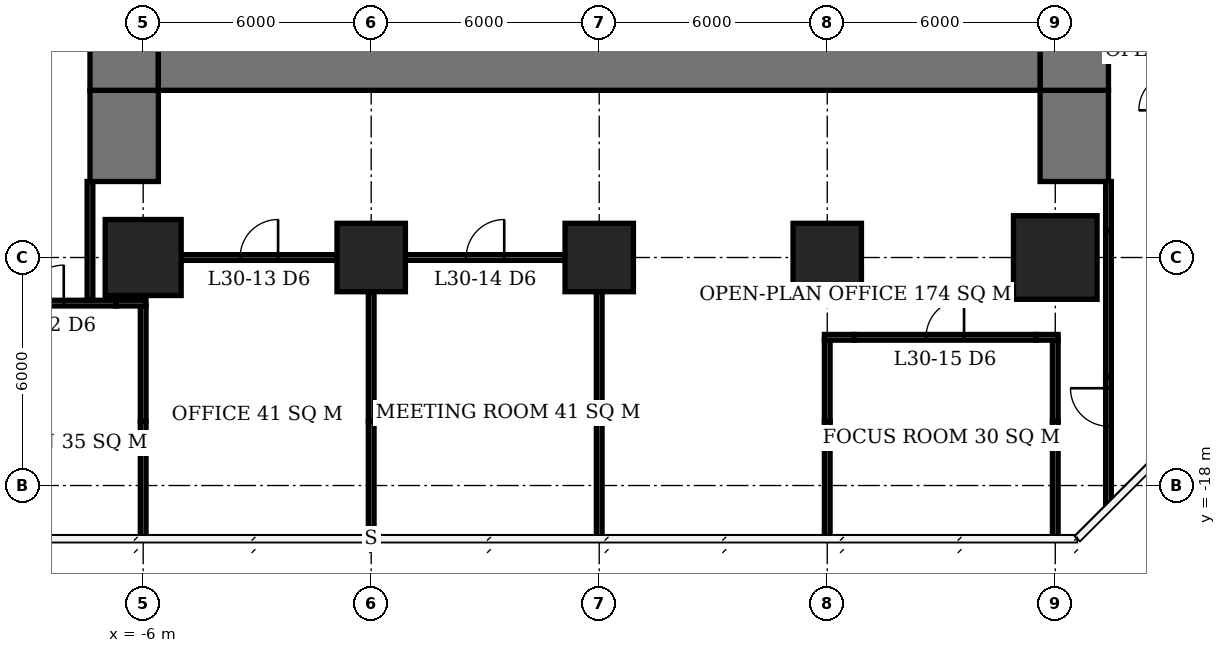
"""IFC4 building model, lengths in metres.
Left out: names, types, materials, properties, quantities, classifications, styles, units other than length and angle.
Written with IfcOpenShell. Run it as: python <this file> out.ifc"""

import sys

from ifc_helpers import new_model, si_unit, direction, frame, frame_2d, origin, origin_2d, place, context, subcontext, project, spatial, rectangle, extrude, element, fill, save


model = new_model("IFC4")
c1 = context("Model", 3, precision=1e-05, world=origin(), true_north=direction((0.0, 1.0)))
c2 = subcontext(c1, "Body", "Model", "MODEL_VIEW")
j1 = project(units=[si_unit("LENGTHUNIT", "METRE"), si_unit("PLANEANGLEUNIT", "RADIAN")], contexts=[c1])
p1 = place(None, origin())
s1 = spatial("IfcSite", under=j1, at=p1, CompositionType="ELEMENT")
p2 = place(p1, origin())
s2 = spatial("IfcBuilding", under=s1, at=p2, CompositionType="ELEMENT")
p3 = place(p2, frame((0.0, 0.0, 125.0)))
s3 = spatial("IfcBuildingStorey", under=s2, at=p3, CompositionType="ELEMENT", Elevation=125.0)
p4 = place(p3, frame((-6.0, -12.0, 0.0), z_axis=(0.0, 0.0, 1.0), x_axis=(1.0, 0.0, 0.0)))
e1 = element("IfcColumn", 1, at=p4, inside=s3, PredefinedType="COLUMN", context=c2, shape_type="SweptSolid", body=[
    extrude(rectangle(XDim=2.0, YDim=2.0, at=origin_2d()), origin(), (0.0, 0.0, 1.0), 3.9),
])
for number, where, z_axis, x_axis in (
    (2, (0.0, -12.0, 0.0), (0.0, 0.0, 1.0), (1.0, 0.0, 0.0)),
    (3, (6.0, -12.0, 0.0), (0.0, 0.0, 1.0), (1.0, 0.0, 0.0)),
    (4, (12.0, -12.0, 0.0), (0.0, 0.0, 1.0), (1.0, 0.0, 0.0)),
):
    element("IfcColumn", number, at=place(p3, frame(where, z_axis=z_axis, x_axis=x_axis)), inside=s3, PredefinedType="COLUMN", context=c2, shape_type="SweptSolid", body=[
        extrude(rectangle(XDim=1.8, YDim=1.8, at=origin_2d()), origin(), (0.0, 0.0, 1.0), 3.9),
    ])
p5 = place(p3, frame((18.0, -12.0, 0.0), z_axis=(0.0, 0.0, 1.0), x_axis=(1.0, 0.0, 0.0)))
e5 = element("IfcColumn", 5, at=p5, inside=s3, PredefinedType="COLUMN", context=c2, shape_type="SweptSolid", body=[
    extrude(rectangle(XDim=2.2, YDim=2.2, at=origin_2d()), origin(), (0.0, 0.0, 1.0), 3.9),
])
p6 = place(p3, frame((-5.6, -6.6, 0.0), z_axis=(0.0, 0.0, 1.0), x_axis=(1.0, 0.0, 0.0)))
e6 = element("IfcWall", 6, at=p6, inside=s3, PredefinedType="SHEAR", context=c2, shape_type="SweptSolid", body=[
    extrude(rectangle(XDim=23.2, YDim=2.0, at=frame_2d((11.6, 0.0))), origin(), (0.0, 0.0, 1.0), 3.9),
])
p7 = place(p3, frame((-6.5, -7.6, 0.0), z_axis=(0.0, 0.0, 1.0), x_axis=(0.0, 1.0, 0.0)))
e7 = element("IfcWall", 7, at=p7, inside=s3, PredefinedType="SHEAR", context=c2, shape_type="SweptSolid", body=[
    extrude(rectangle(XDim=21.2, YDim=1.8, at=frame_2d((10.6, 0.0))), origin(), (0.0, 0.0, 1.0), 3.9),
])
p8 = place(p7, frame((7.8, 0.0, 0.0)))
e8 = element("IfcOpeningElement", 8, at=p8, cuts=e7, PredefinedType="OPENING", context=c2, shape_type="SweptSolid", body=[
    extrude(rectangle(XDim=1.8, YDim=2.4, at=frame_2d((0.9, 1.2))), frame((0.0, 0.91, 0.0), z_axis=(0.0, -1.0, 0.0), x_axis=(1.0, 0.0, 0.0)), (0.0, 0.0, 1.0), 1.82),
])
p9 = place(p3, frame((18.5, -7.6, 0.0), z_axis=(0.0, 0.0, 1.0), x_axis=(0.0, 1.0, 0.0)))
e9 = element("IfcWall", 9, at=p9, inside=s3, PredefinedType="SHEAR", context=c2, shape_type="SweptSolid", body=[
    extrude(rectangle(XDim=21.2, YDim=1.8, at=frame_2d((10.6, 0.0))), origin(), (0.0, 0.0, 1.0), 3.9),
])
p10 = place(p9, frame((9.2, 0.0, 0.0)))
e10 = element("IfcOpeningElement", 10, at=p10, cuts=e9, PredefinedType="OPENING", context=c2, shape_type="SweptSolid", body=[
    extrude(rectangle(XDim=1.8, YDim=2.4, at=frame_2d((0.9, 1.2))), frame((0.0, 0.91, 0.0), z_axis=(0.0, -1.0, 0.0), x_axis=(1.0, 0.0, 0.0)), (0.0, 0.0, 1.0), 1.82),
])
for number, where, z_axis, x_axis in (
    (11, (-6.5, -10.0, 0.0), (0.0, 0.0, 1.0), (0.0, 1.0, 0.0)),
    (12, (18.5, -10.0, 0.0), (0.0, 0.0, 1.0), (0.0, 1.0, 0.0)),
):
    element("IfcWall", number, at=place(p3, frame(where, z_axis=z_axis, x_axis=x_axis)), inside=s3, PredefinedType="SHEAR", context=c2, shape_type="SweptSolid", body=[
        extrude(rectangle(XDim=2.4, YDim=1.8, at=frame_2d((1.2, 0.0))), origin(), (0.0, 0.0, 1.0), 3.9),
    ])
p11 = place(p3, frame((11.925, -14.1, 0.0), z_axis=(0.0, 0.0, 1.0), x_axis=(1.0, 0.0, 0.0)))
e13 = element("IfcWall", 13, at=p11, inside=s3, PredefinedType="PARTITIONING", context=c2, shape_type="SweptSolid", body=[
    extrude(rectangle(XDim=0.785, YDim=0.15, at=frame_2d((0.393, 0.0))), origin(), (0.0, 0.0, 1.0), 2.65),
])
p12 = place(p3, frame((12.71, -14.1, 0.0), z_axis=(0.0, 0.0, 1.0), x_axis=(1.0, 0.0, 0.0)))
e14 = element("IfcWall", 14, at=p12, inside=s3, PredefinedType="PARTITIONING", context=c2, shape_type="SweptSolid", body=[
    extrude(rectangle(XDim=4.78, YDim=0.15, at=frame_2d((2.39, 0.0))), origin(), (0.0, 0.0, 1.0), 3.65),
])
p13 = place(p12, frame((1.89, 0.0, 0.0)))
e15 = element("IfcOpeningElement", 15, at=p13, cuts=e14, PredefinedType="OPENING", context=c2, shape_type="SweptSolid", body=[
    extrude(rectangle(XDim=1.0, YDim=2.1, at=frame_2d((0.5, 1.05))), frame((0.0, 0.085, 0.0), z_axis=(0.0, -1.0, 0.0), x_axis=(1.0, 0.0, 0.0)), (0.0, 0.0, 1.0), 0.17),
])
p14 = place(p3, frame((17.49, -14.1, 0.0), z_axis=(0.0, 0.0, 1.0), x_axis=(1.0, 0.0, 0.0)))
e16 = element("IfcWall", 16, at=p14, inside=s3, PredefinedType="PARTITIONING", context=c2, shape_type="SweptSolid", body=[
    extrude(rectangle(XDim=0.585, YDim=0.15, at=frame_2d((0.292, 0.0))), origin(), (0.0, 0.0, 1.0), 2.65),
])
p15 = place(p3, frame((-11.29, -13.2, 0.0), z_axis=(0.0, 0.0, 1.0), x_axis=(1.0, 0.0, 0.0)))
e17 = element("IfcWall", 17, at=p15, inside=s3, PredefinedType="PARTITIONING", context=c2, shape_type="SweptSolid", body=[
    extrude(rectangle(XDim=4.58, YDim=0.15, at=frame_2d((2.29, 0.0))), origin(), (0.0, 0.0, 1.0), 3.65),
])
p16 = place(p15, frame((2.2, 0.0, 0.0)))
e18 = element("IfcOpeningElement", 18, at=p16, cuts=e17, PredefinedType="OPENING", context=c2, shape_type="SweptSolid", body=[
    extrude(rectangle(XDim=1.0, YDim=2.1, at=frame_2d((0.5, 1.05))), frame((0.0, 0.085, 0.0), z_axis=(0.0, -1.0, 0.0), x_axis=(1.0, 0.0, 0.0)), (0.0, 0.0, 1.0), 0.17),
])
p17 = place(p3, frame((-6.71, -13.2, 0.0), z_axis=(0.0, 0.0, 1.0), x_axis=(1.0, 0.0, 0.0)))
e19 = element("IfcWall", 19, at=p17, inside=s3, PredefinedType="PARTITIONING", context=c2, shape_type="SweptSolid", body=[
    extrude(rectangle(XDim=0.785, YDim=0.15, at=frame_2d((0.393, 0.0))), origin(), (0.0, 0.0, 1.0), 2.65),
])
p18 = place(p3, frame((-5.0, -12.0, 0.0), z_axis=(0.0, 0.0, 1.0), x_axis=(1.0, 0.0, 0.0)))
e20 = element("IfcWall", 20, at=p18, inside=s3, PredefinedType="PARTITIONING", context=c2, shape_type="SweptSolid", body=[
    extrude(rectangle(XDim=4.1, YDim=0.15, at=frame_2d((2.05, 0.0))), origin(), (0.0, 0.0, 1.0), 3.65),
])
p19 = place(p18, frame((1.55, 0.0, 0.0)))
e21 = element("IfcOpeningElement", 21, at=p19, cuts=e20, PredefinedType="OPENING", context=c2, shape_type="SweptSolid", body=[
    extrude(rectangle(XDim=1.0, YDim=2.1, at=frame_2d((0.5, 1.05))), frame((0.0, 0.085, 0.0), z_axis=(0.0, -1.0, 0.0), x_axis=(1.0, 0.0, 0.0)), (0.0, 0.0, 1.0), 0.17),
])
p20 = place(p3, frame((0.9, -12.0, 0.0), z_axis=(0.0, 0.0, 1.0), x_axis=(1.0, 0.0, 0.0)))
e22 = element("IfcWall", 22, at=p20, inside=s3, PredefinedType="PARTITIONING", context=c2, shape_type="SweptSolid", body=[
    extrude(rectangle(XDim=4.2, YDim=0.15, at=frame_2d((2.1, 0.0))), origin(), (0.0, 0.0, 1.0), 3.65),
])
p21 = place(p20, frame((1.6, 0.0, 0.0)))
e23 = element("IfcOpeningElement", 23, at=p21, cuts=e22, PredefinedType="OPENING", context=c2, shape_type="SweptSolid", body=[
    extrude(rectangle(XDim=1.0, YDim=2.1, at=frame_2d((0.5, 1.05))), frame((0.0, 0.085, 0.0), z_axis=(0.0, -1.0, 0.0), x_axis=(1.0, 0.0, 0.0)), (0.0, 0.0, 1.0), 0.17),
])
p22 = place(p3, frame((-6.0, -19.4, 0.0), z_axis=(0.0, 0.0, 1.0), x_axis=(0.0, 1.0, 0.0)))
e24 = element("IfcWall", 24, at=p22, inside=s3, PredefinedType="PARTITIONING", context=c2, shape_type="SweptSolid", body=[
    extrude(rectangle(XDim=3.09, YDim=0.15, at=frame_2d((1.545, 0.0))), origin(), (0.0, 0.0, 1.0), 3.65),
])
p23 = place(p3, frame((-6.0, -16.31, 0.0), z_axis=(0.0, 0.0, 1.0), x_axis=(0.0, 1.0, 0.0)))
e25 = element("IfcWall", 25, at=p23, inside=s3, PredefinedType="PARTITIONING", context=c2, shape_type="SweptSolid", body=[
    extrude(rectangle(XDim=3.035, YDim=0.15, at=frame_2d((1.518, 0.0))), origin(), (0.0, 0.0, 1.0), 2.65),
])
p24 = place(p3, frame((0.0, -19.35, 0.0), z_axis=(0.0, 0.0, 1.0), x_axis=(0.0, 1.0, 0.0)))
e26 = element("IfcWall", 26, at=p24, inside=s3, PredefinedType="PARTITIONING", context=c2, shape_type="SweptSolid", body=[
    extrude(rectangle(XDim=3.04, YDim=0.15, at=frame_2d((1.52, 0.0))), origin(), (0.0, 0.0, 1.0), 3.65),
])
p25 = place(p3, frame((0.0, -16.31, 0.0), z_axis=(0.0, 0.0, 1.0), x_axis=(0.0, 1.0, 0.0)))
e27 = element("IfcWall", 27, at=p25, inside=s3, PredefinedType="PARTITIONING", context=c2, shape_type="SweptSolid", body=[
    extrude(rectangle(XDim=3.41, YDim=0.15, at=frame_2d((1.705, 0.0))), origin(), (0.0, 0.0, 1.0), 2.65),
])
p26 = place(p3, frame((6.0, -19.4, 0.0), z_axis=(0.0, 0.0, 1.0), x_axis=(0.0, 1.0, 0.0)))
e28 = element("IfcWall", 28, at=p26, inside=s3, PredefinedType="PARTITIONING", context=c2, shape_type="SweptSolid", body=[
    extrude(rectangle(XDim=3.09, YDim=0.15, at=frame_2d((1.545, 0.0))), origin(), (0.0, 0.0, 1.0), 3.65),
])
p27 = place(p3, frame((6.0, -16.31, 0.0), z_axis=(0.0, 0.0, 1.0), x_axis=(0.0, 1.0, 0.0)))
e29 = element("IfcWall", 29, at=p27, inside=s3, PredefinedType="PARTITIONING", context=c2, shape_type="SweptSolid", body=[
    extrude(rectangle(XDim=3.41, YDim=0.15, at=frame_2d((1.705, 0.0))), origin(), (0.0, 0.0, 1.0), 2.65),
])
p28 = place(p3, frame((12.0, -19.4, 0.0), z_axis=(0.0, 0.0, 1.0), x_axis=(0.0, 1.0, 0.0)))
e30 = element("IfcWall", 30, at=p28, inside=s3, PredefinedType="PARTITIONING", context=c2, shape_type="SweptSolid", body=[
    extrude(rectangle(XDim=3.09, YDim=0.15, at=frame_2d((1.545, 0.0))), origin(), (0.0, 0.0, 1.0), 3.65),
])
p29 = place(p3, frame((12.0, -16.31, 0.0), z_axis=(0.0, 0.0, 1.0), x_axis=(0.0, 1.0, 0.0)))
e31 = element("IfcWall", 31, at=p29, inside=s3, PredefinedType="PARTITIONING", context=c2, shape_type="SweptSolid", body=[
    extrude(rectangle(XDim=2.135, YDim=0.15, at=frame_2d((1.067, 0.0))), origin(), (0.0, 0.0, 1.0), 2.65),
])
p30 = place(p3, frame((18.0, -19.4, 0.0), z_axis=(0.0, 0.0, 1.0), x_axis=(0.0, 1.0, 0.0)))
e32 = element("IfcWall", 32, at=p30, inside=s3, PredefinedType="PARTITIONING", context=c2, shape_type="SweptSolid", body=[
    extrude(rectangle(XDim=3.09, YDim=0.15, at=frame_2d((1.545, 0.0))), origin(), (0.0, 0.0, 1.0), 3.65),
])
p31 = place(p3, frame((18.0, -16.31, 0.0), z_axis=(0.0, 0.0, 1.0), x_axis=(0.0, 1.0, 0.0)))
e33 = element("IfcWall", 33, at=p31, inside=s3, PredefinedType="PARTITIONING", context=c2, shape_type="SweptSolid", body=[
    extrude(rectangle(XDim=2.135, YDim=0.15, at=frame_2d((1.067, 0.0))), origin(), (0.0, 0.0, 1.0), 2.65),
])
p32 = place(p3, frame((-7.4, -13.125, 0.0), z_axis=(0.0, 0.0, 1.0), x_axis=(0.0, 1.0, 0.0)))
e34 = element("IfcWall", 34, at=p32, inside=s3, PredefinedType="PARTITIONING", context=c2, shape_type="SweptSolid", body=[
    extrude(rectangle(XDim=3.125, YDim=0.15, at=frame_2d((1.562, 0.0))), origin(), (0.0, 0.0, 1.0), 3.65),
])
p33 = place(p3, frame((19.4, -18.489, 0.0), z_axis=(0.0, 0.0, 1.0), x_axis=(0.0, 1.0, 0.0)))
e35 = element("IfcWall", 35, at=p33, inside=s3, PredefinedType="PARTITIONING", context=c2, shape_type="SweptSolid", body=[
    extrude(rectangle(XDim=3.349, YDim=0.15, at=frame_2d((1.675, 0.0))), origin(), (0.0, 0.0, 1.0), 3.65),
])
p34 = place(p33, frame((2.049, 0.0, 0.0)))
e36 = element("IfcOpeningElement", 36, at=p34, cuts=e35, PredefinedType="OPENING", context=c2, shape_type="SweptSolid", body=[
    extrude(rectangle(XDim=1.0, YDim=2.1, at=frame_2d((0.5, 1.05))), frame((0.0, 0.085, 0.0), z_axis=(0.0, -1.0, 0.0), x_axis=(1.0, 0.0, 0.0)), (0.0, 0.0, 1.0), 0.17),
])
p35 = place(p3, frame((19.4, -15.14, 0.0), z_axis=(0.0, 0.0, 1.0), x_axis=(0.0, 1.0, 0.0)))
e37 = element("IfcWall", 37, at=p35, inside=s3, PredefinedType="PARTITIONING", context=c2, shape_type="SweptSolid", body=[
    extrude(rectangle(XDim=3.85, YDim=0.15, at=frame_2d((1.925, 0.0))), origin(), (0.0, 0.0, 1.0), 2.65),
])
p36 = place(p3, frame((19.4, -11.29, 0.0), z_axis=(0.0, 0.0, 1.0), x_axis=(0.0, 1.0, 0.0)))
e38 = element("IfcWall", 38, at=p36, inside=s3, PredefinedType="PARTITIONING", context=c2, shape_type="SweptSolid", body=[
    extrude(rectangle(XDim=1.29, YDim=0.15, at=frame_2d((0.645, 0.0))), origin(), (0.0, 0.0, 1.0), 3.65),
])
p37 = place(p16, origin())
e39 = element("IfcDoor", 39, at=p37, inside=s3, OperationType="SINGLE_SWING_RIGHT", PredefinedType="DOOR", context=c2, shape_type="SweptSolid", body=[
    extrude(rectangle(XDim=1.0, YDim=2.1, at=frame_2d((0.5, 1.05))), frame((0.0, 0.025, 0.0), z_axis=(0.0, -1.0, 0.0), x_axis=(1.0, 0.0, 0.0)), (0.0, 0.0, 1.0), 0.05),
])
fill(e18, e39)
p38 = place(p19, origin())
e40 = element("IfcDoor", 40, at=p38, inside=s3, OperationType="SINGLE_SWING_RIGHT", PredefinedType="DOOR", context=c2, shape_type="SweptSolid", body=[
    extrude(rectangle(XDim=1.0, YDim=2.1, at=frame_2d((0.5, 1.05))), frame((0.0, 0.025, 0.0), z_axis=(0.0, -1.0, 0.0), x_axis=(1.0, 0.0, 0.0)), (0.0, 0.0, 1.0), 0.05),
])
fill(e21, e40)
p39 = place(p21, origin())
e41 = element("IfcDoor", 41, at=p39, inside=s3, OperationType="SINGLE_SWING_RIGHT", PredefinedType="DOOR", context=c2, shape_type="SweptSolid", body=[
    extrude(rectangle(XDim=1.0, YDim=2.1, at=frame_2d((0.5, 1.05))), frame((0.0, 0.025, 0.0), z_axis=(0.0, -1.0, 0.0), x_axis=(1.0, 0.0, 0.0)), (0.0, 0.0, 1.0), 0.05),
])
fill(e23, e41)
p40 = place(p13, origin())
e42 = element("IfcDoor", 42, at=p40, inside=s3, OperationType="SINGLE_SWING_RIGHT", PredefinedType="DOOR", context=c2, shape_type="SweptSolid", body=[
    extrude(rectangle(XDim=1.0, YDim=2.1, at=frame_2d((0.5, 1.05))), frame((0.0, 0.025, 0.0), z_axis=(0.0, -1.0, 0.0), x_axis=(1.0, 0.0, 0.0)), (0.0, 0.0, 1.0), 0.05),
])
fill(e15, e42)
p41 = place(p34, origin())
e43 = element("IfcDoor", 43, at=p41, inside=s3, OperationType="SINGLE_SWING_RIGHT", PredefinedType="DOOR", context=c2, shape_type="SweptSolid", body=[
    extrude(rectangle(XDim=1.0, YDim=2.1, at=frame_2d((0.5, 1.05))), frame((0.0, 0.025, 0.0), z_axis=(0.0, -1.0, 0.0), x_axis=(1.0, 0.0, 0.0)), (0.0, 0.0, 1.0), 0.05),
])
fill(e36, e43)
save(model, sys.argv[1])
